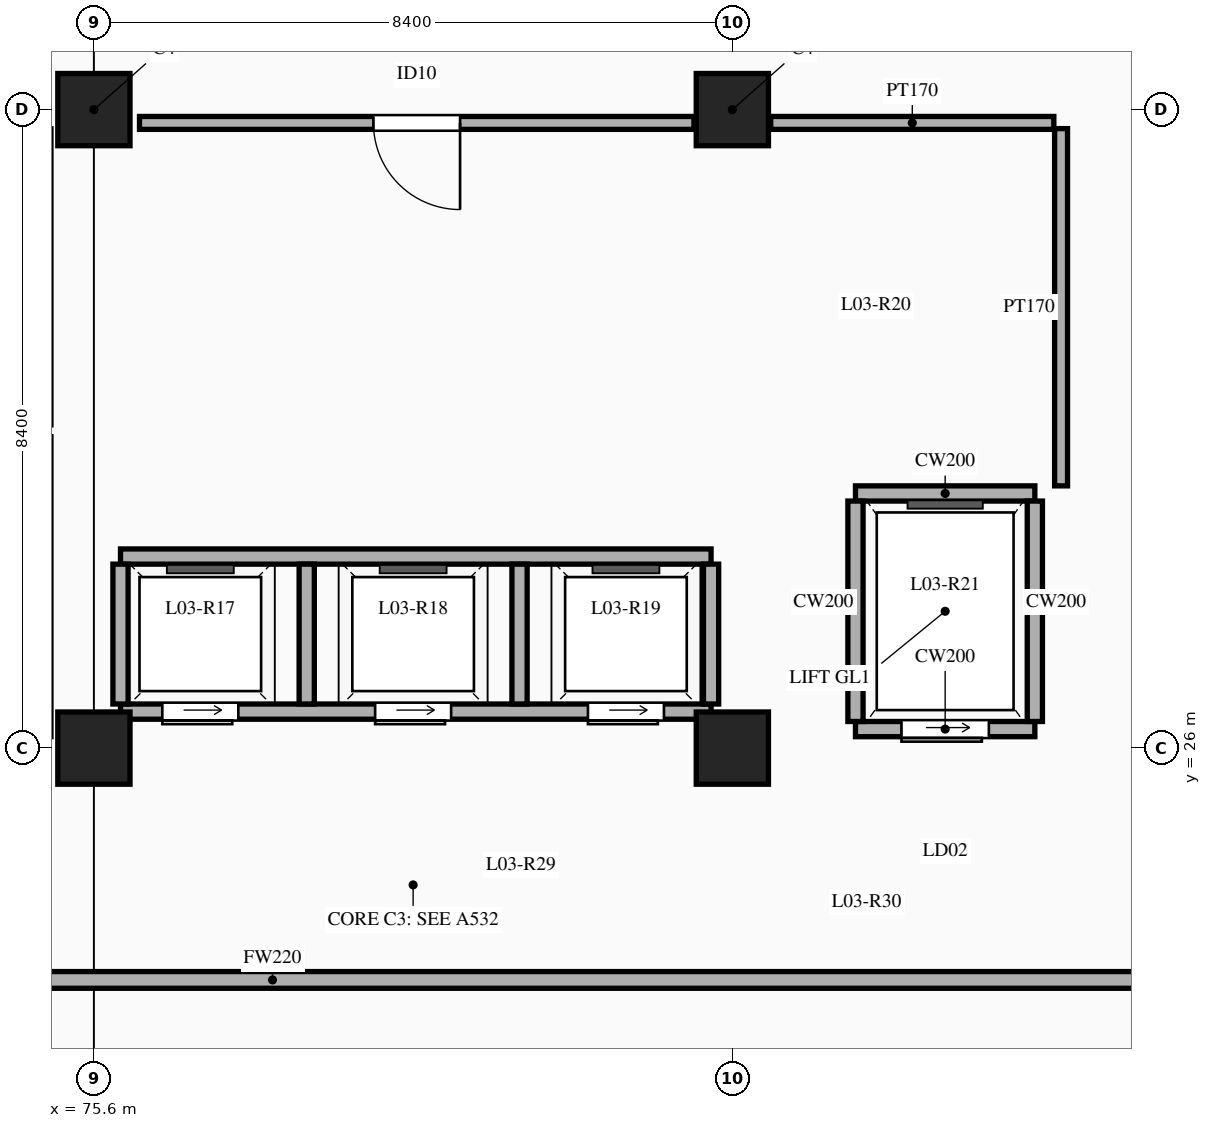
"""IFC4 building model, lengths in metres.
Left out: names, types, materials, properties, quantities, classifications, styles, units other than length and angle.
Written with IfcOpenShell. Run it as: python <this file> out.ifc"""

import sys

from ifc_helpers import new_model, si_unit, direction, frame, frame_2d, origin, origin_2d, place, context, subcontext, project, spatial, rectangle, extrude, element, fill, save


model = new_model("IFC4")
c1 = context("Model", 3, precision=1e-05, world=origin(), true_north=direction((0.0, 1.0)))
c2 = subcontext(c1, "Body", "Model", "MODEL_VIEW")
j1 = project(units=[si_unit("LENGTHUNIT", "METRE"), si_unit("PLANEANGLEUNIT", "RADIAN")], contexts=[c1])
p1 = place(None, origin())
s1 = spatial("IfcSite", under=j1, at=p1, CompositionType="ELEMENT")
p2 = place(p1, origin())
s2 = spatial("IfcBuilding", under=s1, at=p2, CompositionType="ELEMENT")
p3 = place(p2, frame((0.0, 0.0, 15.0)))
s3 = spatial("IfcBuildingStorey", under=s2, at=p3, CompositionType="ELEMENT", Elevation=15.0)
for number, where, z_axis, x_axis in (
    (1, (75.6, 26.0, 0.0), (0.0, 0.0, 1.0), (1.0, 0.0, 0.0)),
    (2, (75.6, 34.4, 0.0), (0.0, 0.0, 1.0), (1.0, 0.0, 0.0)),
    (3, (84.0, 26.0, 0.0), (0.0, 0.0, 1.0), (1.0, 0.0, 0.0)),
    (4, (84.0, 34.4, 0.0), (0.0, 0.0, 1.0), (1.0, 0.0, 0.0)),
):
    element("IfcColumn", number, at=place(p3, frame(where, z_axis=z_axis, x_axis=x_axis)), inside=s3, PredefinedType="COLUMN", context=c2, shape_type="SweptSolid", body=[
        extrude(rectangle(XDim=0.95, YDim=0.95, at=origin_2d()), origin(), (0.0, 0.0, 1.0), 4.5),
    ])
p4 = place(p3, frame((75.95, 26.48, 0.0), z_axis=(0.0, 0.0, 1.0), x_axis=(1.0, 0.0, 0.0)))
e5 = element("IfcWall", 5, at=p4, inside=s3, PredefinedType="SOLIDWALL", context=c2, shape_type="SweptSolid", body=[
    extrude(rectangle(XDim=7.77, YDim=0.2, at=frame_2d((3.885, 0.0))), origin(), (0.0, 0.0, 1.0), 3.48),
])
p5 = place(p4, frame((0.55, 0.0, 0.0)))
e6 = element("IfcOpeningElement", 6, at=p5, cuts=e5, PredefinedType="OPENING", context=c2, shape_type="SweptSolid", body=[
    extrude(rectangle(XDim=1.0, YDim=2.15, at=frame_2d((0.5, 1.075))), frame((0.0, 0.11, 0.0), z_axis=(0.0, -1.0, 0.0), x_axis=(1.0, 0.0, 0.0)), (0.0, 0.0, 1.0), 0.22),
])
p6 = place(p4, frame((3.35, 0.0, 0.0)))
e7 = element("IfcOpeningElement", 7, at=p6, cuts=e5, PredefinedType="OPENING", context=c2, shape_type="SweptSolid", body=[
    extrude(rectangle(XDim=1.0, YDim=2.15, at=frame_2d((0.5, 1.075))), frame((0.0, 0.11, 0.0), z_axis=(0.0, -1.0, 0.0), x_axis=(1.0, 0.0, 0.0)), (0.0, 0.0, 1.0), 0.22),
])
p7 = place(p4, frame((6.15, 0.0, 0.0)))
e8 = element("IfcOpeningElement", 8, at=p7, cuts=e5, PredefinedType="OPENING", context=c2, shape_type="SweptSolid", body=[
    extrude(rectangle(XDim=1.0, YDim=2.15, at=frame_2d((0.5, 1.075))), frame((0.0, 0.11, 0.0), z_axis=(0.0, -1.0, 0.0), x_axis=(1.0, 0.0, 0.0)), (0.0, 0.0, 1.0), 0.22),
])
p8 = place(p3, frame((75.95, 28.52, 0.0), z_axis=(0.0, 0.0, 1.0), x_axis=(1.0, 0.0, 0.0)))
e9 = element("IfcWall", 9, at=p8, inside=s3, PredefinedType="SOLIDWALL", context=c2, shape_type="SweptSolid", body=[
    extrude(rectangle(XDim=7.77, YDim=0.2, at=frame_2d((3.885, 0.0))), origin(), (0.0, 0.0, 1.0), 4.25),
])
p9 = place(p3, frame((75.95, 26.58, 0.0), z_axis=(0.0, 0.0, 1.0), x_axis=(0.0, 1.0, 0.0)))
e10 = element("IfcWall", 10, at=p9, inside=s3, PredefinedType="SOLIDWALL", context=c2, shape_type="SweptSolid", body=[
    extrude(rectangle(XDim=1.84, YDim=0.2, at=frame_2d((0.92, 0.0))), origin(), (0.0, 0.0, 1.0), 3.63),
])
for number, where, z_axis, x_axis in (
    (11, (78.4, 26.58, 0.0), (0.0, 0.0, 1.0), (0.0, 1.0, 0.0)),
    (12, (81.2, 26.58, 0.0), (0.0, 0.0, 1.0), (0.0, 1.0, 0.0)),
):
    element("IfcWall", number, at=place(p3, frame(where, z_axis=z_axis, x_axis=x_axis)), inside=s3, PredefinedType="SOLIDWALL", context=c2, shape_type="SweptSolid", body=[
        extrude(rectangle(XDim=1.84, YDim=0.2, at=frame_2d((0.92, 0.0))), origin(), (0.0, 0.0, 1.0), 4.25),
    ])
p10 = place(p3, frame((83.72, 26.58, 0.0), z_axis=(0.0, 0.0, 1.0), x_axis=(0.0, 1.0, 0.0)))
e13 = element("IfcWall", 13, at=p10, inside=s3, PredefinedType="SOLIDWALL", context=c2, shape_type="SweptSolid", body=[
    extrude(rectangle(XDim=1.84, YDim=0.2, at=frame_2d((0.92, 0.0))), origin(), (0.0, 0.0, 1.0), 3.63),
])
p11 = place(p3, frame((85.62, 26.25, 0.0), z_axis=(0.0, 0.0, 1.0), x_axis=(1.0, 0.0, 0.0)))
e14 = element("IfcWall", 14, at=p11, inside=s3, PredefinedType="SOLIDWALL", context=c2, shape_type="SweptSolid", body=[
    extrude(rectangle(XDim=2.36, YDim=0.2, at=frame_2d((1.18, 0.0))), origin(), (0.0, 0.0, 1.0), 3.48),
])
p12 = place(p11, frame((0.605, 0.0, 0.0)))
e15 = element("IfcOpeningElement", 15, at=p12, cuts=e14, PredefinedType="OPENING", context=c2, shape_type="SweptSolid", body=[
    extrude(rectangle(XDim=1.15, YDim=2.2, at=frame_2d((0.575, 1.1))), frame((0.0, 0.11, 0.0), z_axis=(0.0, -1.0, 0.0), x_axis=(1.0, 0.0, 0.0)), (0.0, 0.0, 1.0), 0.22),
])
p13 = place(p3, frame((85.62, 29.35, 0.0), z_axis=(0.0, 0.0, 1.0), x_axis=(1.0, 0.0, 0.0)))
e16 = element("IfcWall", 16, at=p13, inside=s3, PredefinedType="SOLIDWALL", context=c2, shape_type="SweptSolid", body=[
    extrude(rectangle(XDim=2.36, YDim=0.2, at=frame_2d((1.18, 0.0))), origin(), (0.0, 0.0, 1.0), 4.25),
])
p14 = place(p3, frame((85.62, 26.35, 0.0), z_axis=(0.0, 0.0, 1.0), x_axis=(0.0, 1.0, 0.0)))
e17 = element("IfcWall", 17, at=p14, inside=s3, PredefinedType="SOLIDWALL", context=c2, shape_type="SweptSolid", body=[
    extrude(rectangle(XDim=2.9, YDim=0.2, at=frame_2d((1.45, 0.0))), origin(), (0.0, 0.0, 1.0), 4.25),
])
p15 = place(p3, frame((87.98, 26.35, 0.0), z_axis=(0.0, 0.0, 1.0), x_axis=(0.0, 1.0, 0.0)))
e18 = element("IfcWall", 18, at=p15, inside=s3, PredefinedType="SOLIDWALL", context=c2, shape_type="SweptSolid", body=[
    extrude(rectangle(XDim=2.9, YDim=0.2, at=frame_2d((1.45, 0.0))), origin(), (0.0, 0.0, 1.0), 3.83),
])
p16 = place(p3, frame((59.5, 22.95, 0.0), z_axis=(0.0, 0.0, 1.0), x_axis=(1.0, 0.0, 0.0)))
e19 = element("IfcWall", 19, at=p16, inside=s3, PredefinedType="SOLIDWALL", context=c2, shape_type="SweptSolid", body=[
    extrude(rectangle(XDim=32.2, YDim=0.22, at=frame_2d((16.1, 0.0))), origin(), (0.0, 0.0, 1.0), 3.45),
])
p17 = place(p16, frame((3.0, 0.0, 0.0)))
e20 = element("IfcOpeningElement", 20, at=p17, cuts=e19, PredefinedType="OPENING", context=c2, shape_type="SweptSolid", body=[
    extrude(rectangle(XDim=1.2, YDim=2.2, at=frame_2d((0.6, 1.1))), frame((0.0, 0.12, 0.0), z_axis=(0.0, -1.0, 0.0), x_axis=(1.0, 0.0, 0.0)), (0.0, 0.0, 1.0), 0.24),
])
p18 = place(p3, frame((88.325, 29.45, 0.0), z_axis=(0.0, 0.0, 1.0), x_axis=(0.0, 1.0, 0.0)))
e21 = element("IfcWall", 21, at=p18, inside=s3, PredefinedType="PARTITIONING", context=c2, shape_type="SweptSolid", body=[
    extrude(rectangle(XDim=4.7, YDim=0.17, at=frame_2d((2.35, 0.0))), origin(), (0.0, 0.0, 1.0), 3.45),
])
p19 = place(p3, frame((76.2, 34.225, 0.0), z_axis=(0.0, 0.0, 1.0), x_axis=(1.0, 0.0, 0.0)))
e22 = element("IfcWall", 22, at=p19, inside=s3, PredefinedType="PARTITIONING", context=c2, shape_type="SweptSolid", body=[
    extrude(rectangle(XDim=7.295, YDim=0.17, at=frame_2d((3.647, 0.0))), origin(), (0.0, 0.0, 1.0), 3.45),
])
p20 = place(p19, frame((3.077, 0.0, 0.0)))
e23 = element("IfcOpeningElement", 23, at=p20, cuts=e22, PredefinedType="OPENING", context=c2, shape_type="SweptSolid", body=[
    extrude(rectangle(XDim=1.14, YDim=2.22, at=frame_2d((0.57, 1.11))), frame((0.0, 0.095, 0.0), z_axis=(0.0, -1.0, 0.0), x_axis=(1.0, 0.0, 0.0)), (0.0, 0.0, 1.0), 0.19),
])
p21 = place(p3, frame((84.505, 34.225, 0.0), z_axis=(0.0, 0.0, 1.0), x_axis=(1.0, 0.0, 0.0)))
e24 = element("IfcWall", 24, at=p21, inside=s3, PredefinedType="PARTITIONING", context=c2, shape_type="SweptSolid", body=[
    extrude(rectangle(XDim=3.725, YDim=0.17, at=frame_2d((1.863, 0.0))), origin(), (0.0, 0.0, 1.0), 3.45),
])
p22 = place(p5, frame((1.0, 0.0, 0.0), z_axis=(0.0, 0.0, 1.0), x_axis=(-1.0, 0.0, 0.0)))
e25 = element("IfcDoor", 25, at=p22, inside=s3, OperationType="SLIDING_TO_LEFT", PredefinedType="DOOR", context=c2, shape_type="SweptSolid", body=[
    extrude(rectangle(XDim=1.0, YDim=2.15, at=frame_2d((0.5, 1.075))), frame((0.0, 0.025, 0.0), z_axis=(0.0, -1.0, 0.0), x_axis=(1.0, 0.0, 0.0)), (0.0, 0.0, 1.0), 0.05),
])
fill(e6, e25)
p23 = place(p6, frame((1.0, 0.0, 0.0), z_axis=(0.0, 0.0, 1.0), x_axis=(-1.0, 0.0, 0.0)))
e26 = element("IfcDoor", 26, at=p23, inside=s3, OperationType="SLIDING_TO_LEFT", PredefinedType="DOOR", context=c2, shape_type="SweptSolid", body=[
    extrude(rectangle(XDim=1.0, YDim=2.15, at=frame_2d((0.5, 1.075))), frame((0.0, 0.025, 0.0), z_axis=(0.0, -1.0, 0.0), x_axis=(1.0, 0.0, 0.0)), (0.0, 0.0, 1.0), 0.05),
])
fill(e7, e26)
p24 = place(p7, frame((1.0, 0.0, 0.0), z_axis=(0.0, 0.0, 1.0), x_axis=(-1.0, 0.0, 0.0)))
e27 = element("IfcDoor", 27, at=p24, inside=s3, OperationType="SLIDING_TO_LEFT", PredefinedType="DOOR", context=c2, shape_type="SweptSolid", body=[
    extrude(rectangle(XDim=1.0, YDim=2.15, at=frame_2d((0.5, 1.075))), frame((0.0, 0.025, 0.0), z_axis=(0.0, -1.0, 0.0), x_axis=(1.0, 0.0, 0.0)), (0.0, 0.0, 1.0), 0.05),
])
fill(e8, e27)
p25 = place(p12, frame((1.15, 0.0, 0.0), z_axis=(0.0, 0.0, 1.0), x_axis=(-1.0, 0.0, 0.0)))
e28 = element("IfcDoor", 28, at=p25, inside=s3, OperationType="SLIDING_TO_LEFT", PredefinedType="DOOR", context=c2, shape_type="SweptSolid", body=[
    extrude(rectangle(XDim=1.15, YDim=2.2, at=frame_2d((0.575, 1.1))), frame((0.0, 0.025, 0.0), z_axis=(0.0, -1.0, 0.0), x_axis=(1.0, 0.0, 0.0)), (0.0, 0.0, 1.0), 0.05),
])
fill(e15, e28)
p26 = place(p20, frame((1.14, 0.0, 0.0), z_axis=(0.0, 0.0, 1.0), x_axis=(-1.0, 0.0, 0.0)))
e29 = element("IfcDoor", 29, at=p26, inside=s3, OperationType="SINGLE_SWING_LEFT", PredefinedType="DOOR", context=c2, shape_type="SweptSolid", body=[
    extrude(rectangle(XDim=1.14, YDim=2.22, at=frame_2d((0.57, 1.11))), frame((0.0, 0.025, 0.0), z_axis=(0.0, -1.0, 0.0), x_axis=(1.0, 0.0, 0.0)), (0.0, 0.0, 1.0), 0.05),
])
fill(e23, e29)
save(model, sys.argv[1])
